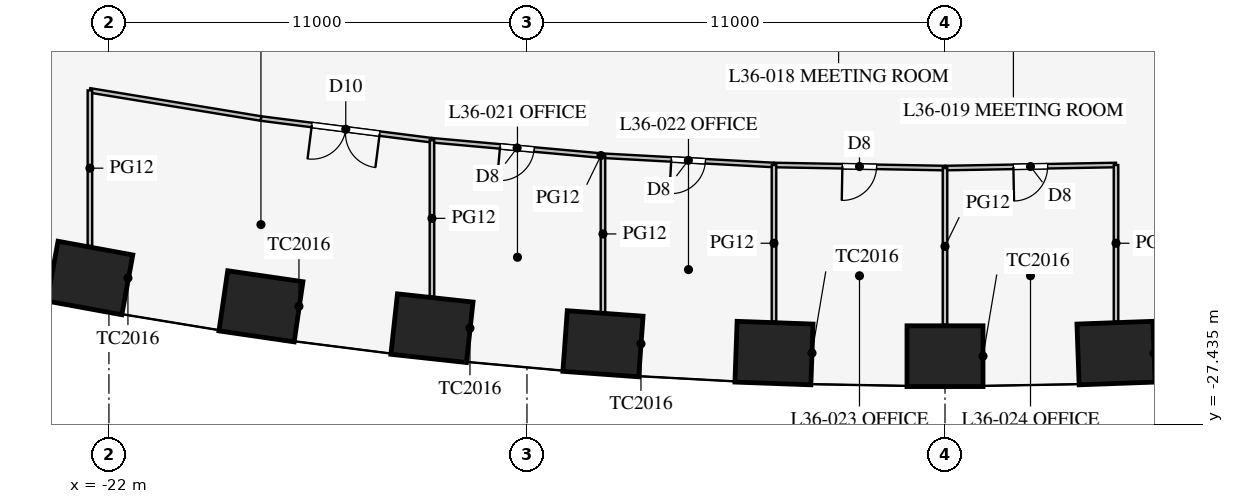
"""IFC4 building model, lengths in metres.
Left out: names, types, materials, properties, quantities, classifications, styles, units other than length and angle.
Written with IfcOpenShell. Run it as: python <this file> out.ifc"""

import sys

from ifc_helpers import new_model, si_unit, direction, frame, frame_2d, origin, origin_2d, place, context, subcontext, project, spatial, rectangle, extrude, element, fill, save


model = new_model("IFC4")
c1 = context("Model", 3, precision=1e-05, world=origin(), true_north=direction((0.0, 1.0)))
c2 = subcontext(c1, "Body", "Model", "MODEL_VIEW")
j1 = project(units=[si_unit("LENGTHUNIT", "METRE"), si_unit("PLANEANGLEUNIT", "RADIAN")], contexts=[c1])
p1 = place(None, origin())
s1 = spatial("IfcSite", under=j1, at=p1, CompositionType="ELEMENT")
p2 = place(p1, origin())
s2 = spatial("IfcBuilding", under=s1, at=p2, CompositionType="ELEMENT")
p3 = place(p2, frame((0.0, 0.0, 157.7)))
s3 = spatial("IfcBuildingStorey", under=s2, at=p3, CompositionType="ELEMENT", Elevation=157.7)
for number, where, z_axis, x_axis in (
    (1, (-22.5, -23.593, 0.0), (0.0, 0.0, 1.0), (0.984, -0.18, 0.0)),
    (2, (-18.0, -24.337, 0.0), (0.0, 0.0, 1.0), (0.99, -0.144, 0.0)),
    (3, (-13.5, -24.913, 0.0), (0.0, 0.0, 1.0), (0.994, -0.108, 0.0)),
    (4, (-9.0, -25.323, 0.0), (0.0, 0.0, 1.0), (0.997, -0.072, 0.0)),
    (5, (-4.5, -25.568, 0.0), (0.0, 0.0, 1.0), (0.999, -0.036, 0.0)),
    (6, (0.0, -25.65, 0.0), (0.0, 0.0, 1.0), (1.0, 0.0, 0.0)),
    (7, (4.5, -25.568, 0.0), (0.0, 0.0, 1.0), (0.999, 0.036, 0.0)),
):
    element("IfcColumn", number, at=place(p3, frame(where, z_axis=z_axis, x_axis=x_axis)), inside=s3, PredefinedType="COLUMN", context=c2, shape_type="SweptSolid", body=[
        extrude(rectangle(XDim=2.0, YDim=1.6, at=origin_2d()), origin(), (0.0, 0.0, 1.0), 4.2),
    ])
p4 = place(p3, frame((0.0, -20.7, 0.0), z_axis=(0.0, 0.0, 1.0), x_axis=(0.999837820638, 0.018009231578, 0.0)))
e8 = element("IfcWall", 8, at=p4, inside=s3, PredefinedType="PARTITIONING", context=c2, shape_type="SweptSolid", body=[
    extrude(rectangle(XDim=4.501, YDim=0.12, at=frame_2d((2.25, 0.0))), origin(), (0.0, 0.0, 1.0), 2.9),
])
p5 = place(p4, frame((1.8, 0.0, 0.15)))
e9 = element("IfcOpeningElement", 9, at=p5, cuts=e8, PredefinedType="OPENING", context=c2, shape_type="SweptSolid", body=[
    extrude(rectangle(XDim=0.9, YDim=2.1, at=frame_2d((0.45, 1.05))), frame((0.0, 0.07, 0.0), z_axis=(0.0, -1.0, 0.0), x_axis=(1.0, 0.0, 0.0)), (0.0, 0.0, 1.0), 0.14),
])
p6 = place(p3, frame((-13.5, -19.968, 0.0), z_axis=(0.0, 0.0, 1.0), x_axis=(0.995930325215, -0.090126507295, 0.0)))
e10 = element("IfcWall", 10, at=p6, inside=s3, PredefinedType="PARTITIONING", context=c2, shape_type="SweptSolid", body=[
    extrude(rectangle(XDim=4.518, YDim=0.12, at=frame_2d((2.259, 0.0))), origin(), (0.0, 0.0, 1.0), 2.9),
])
p7 = place(p6, frame((1.8, 0.0, 0.15)))
e11 = element("IfcOpeningElement", 11, at=p7, cuts=e10, PredefinedType="OPENING", context=c2, shape_type="SweptSolid", body=[
    extrude(rectangle(XDim=0.9, YDim=2.1, at=frame_2d((0.45, 1.05))), frame((0.0, 0.07, 0.0), z_axis=(0.0, -1.0, 0.0), x_axis=(1.0, 0.0, 0.0)), (0.0, 0.0, 1.0), 0.14),
])
p8 = place(p3, frame((-18.0, -19.396, 0.0), z_axis=(0.0, 0.0, 1.0), x_axis=(0.992010652594, -0.12615413247, 0.0)))
e12 = element("IfcWall", 12, at=p8, inside=s3, PredefinedType="PARTITIONING", context=c2, shape_type="SweptSolid", body=[
    extrude(rectangle(XDim=4.536, YDim=0.12, at=frame_2d((2.268, 0.0))), origin(), (0.0, 0.0, 1.0), 2.9),
])
p9 = place(p8, frame((1.35, 0.0, 0.15)))
e13 = element("IfcOpeningElement", 13, at=p9, cuts=e12, PredefinedType="OPENING", context=c2, shape_type="SweptSolid", body=[
    extrude(rectangle(XDim=1.8, YDim=2.1, at=frame_2d((0.9, 1.05))), frame((0.0, 0.07, 0.0), z_axis=(0.0, -1.0, 0.0), x_axis=(1.0, 0.0, 0.0)), (0.0, 0.0, 1.0), 0.14),
])
p10 = place(p3, frame((-22.5, -18.656, 0.0), z_axis=(0.0, 0.0, 1.0), x_axis=(0.986764681833, -0.162158757664, 0.0)))
e14 = element("IfcWall", 14, at=p10, inside=s3, PredefinedType="PARTITIONING", context=c2, shape_type="SweptSolid", body=[
    extrude(rectangle(XDim=4.56, YDim=0.12, at=frame_2d((2.28, 0.0))), origin(), (0.0, 0.0, 1.0), 2.9),
])
p11 = place(p3, frame((-4.5, -20.619, 0.0), z_axis=(0.0, 0.0, 1.0), x_axis=(0.999837820638, -0.018009231578, 0.0)))
e15 = element("IfcWall", 15, at=p11, inside=s3, PredefinedType="PARTITIONING", context=c2, shape_type="SweptSolid", body=[
    extrude(rectangle(XDim=4.501, YDim=0.12, at=frame_2d((2.25, 0.0))), origin(), (0.0, 0.0, 1.0), 2.9),
])
p12 = place(p11, frame((1.8, 0.0, 0.15)))
e16 = element("IfcOpeningElement", 16, at=p12, cuts=e15, PredefinedType="OPENING", context=c2, shape_type="SweptSolid", body=[
    extrude(rectangle(XDim=0.9, YDim=2.1, at=frame_2d((0.45, 1.05))), frame((0.0, 0.07, 0.0), z_axis=(0.0, -1.0, 0.0), x_axis=(1.0, 0.0, 0.0)), (0.0, 0.0, 1.0), 0.14),
])
p13 = place(p3, frame((-9.0, -20.375, 0.0), z_axis=(0.0, 0.0, 1.0), x_axis=(0.998537376538, -0.054065771581, 0.0)))
e17 = element("IfcWall", 17, at=p13, inside=s3, PredefinedType="PARTITIONING", context=c2, shape_type="SweptSolid", body=[
    extrude(rectangle(XDim=4.507, YDim=0.12, at=frame_2d((2.253, 0.0))), origin(), (0.0, 0.0, 1.0), 2.9),
])
p14 = place(p13, frame((1.8, 0.0, 0.15)))
e18 = element("IfcOpeningElement", 18, at=p14, cuts=e17, PredefinedType="OPENING", context=c2, shape_type="SweptSolid", body=[
    extrude(rectangle(XDim=0.9, YDim=2.1, at=frame_2d((0.45, 1.05))), frame((0.0, 0.07, 0.0), z_axis=(0.0, -1.0, 0.0), x_axis=(1.0, 0.0, 0.0)), (0.0, 0.0, 1.0), 0.14),
])
p15 = place(p3, frame((0.0, -20.7, 0.0), z_axis=(0.0, 0.0, 1.0), x_axis=(0.0, -1.0, 0.0)))
e19 = element("IfcWall", 19, at=p15, inside=s3, PredefinedType="PARTITIONING", context=c2, shape_type="SweptSolid", body=[
    extrude(rectangle(XDim=4.12, YDim=0.12, at=frame_2d((2.06, 0.0))), origin(), (0.0, 0.0, 1.0), 2.8),
])
p16 = place(p3, frame((4.5, -20.619, 0.0), z_axis=(0.0, 0.0, 1.0), x_axis=(0.0, -1.0, 0.0)))
e20 = element("IfcWall", 20, at=p16, inside=s3, PredefinedType="PARTITIONING", context=c2, shape_type="SweptSolid", body=[
    extrude(rectangle(XDim=4.119, YDim=0.12, at=frame_2d((2.06, 0.0))), origin(), (0.0, 0.0, 1.0), 2.8),
])
p17 = place(p3, frame((-13.5, -19.968, 0.0), z_axis=(0.0, 0.0, 1.0), x_axis=(0.0, -1.0, 0.0)))
e21 = element("IfcWall", 21, at=p17, inside=s3, PredefinedType="PARTITIONING", context=c2, shape_type="SweptSolid", body=[
    extrude(rectangle(XDim=4.11, YDim=0.12, at=frame_2d((2.055, 0.0))), origin(), (0.0, 0.0, 1.0), 2.6),
])
p18 = place(p3, frame((-22.5, -18.656, 0.0), z_axis=(0.0, 0.0, 1.0), x_axis=(0.0, -1.0, 0.0)))
e22 = element("IfcWall", 22, at=p18, inside=s3, PredefinedType="PARTITIONING", context=c2, shape_type="SweptSolid", body=[
    extrude(rectangle(XDim=4.093, YDim=0.12, at=frame_2d((2.046, 0.0))), origin(), (0.0, 0.0, 1.0), 2.9),
])
p19 = place(p3, frame((-4.5, -20.619, 0.0), z_axis=(0.0, 0.0, 1.0), x_axis=(0.0, -1.0, 0.0)))
e23 = element("IfcWall", 23, at=p19, inside=s3, PredefinedType="PARTITIONING", context=c2, shape_type="SweptSolid", body=[
    extrude(rectangle(XDim=4.119, YDim=0.12, at=frame_2d((2.06, 0.0))), origin(), (0.0, 0.0, 1.0), 2.8),
])
p20 = place(p3, frame((-9.0, -20.375, 0.0), z_axis=(0.0, 0.0, 1.0), x_axis=(0.0, -1.0, 0.0)))
e24 = element("IfcWall", 24, at=p20, inside=s3, PredefinedType="PARTITIONING", context=c2, shape_type="SweptSolid", body=[
    extrude(rectangle(XDim=4.116, YDim=0.12, at=frame_2d((2.058, 0.0))), origin(), (0.0, 0.0, 1.0), 2.9),
])
p21 = place(p9, frame((1.8, 0.0, 0.0), z_axis=(0.0, 0.0, 1.0), x_axis=(-1.0, 0.0, 0.0)))
e25 = element("IfcDoor", 25, at=p21, inside=s3, OperationType="DOUBLE_DOOR_SINGLE_SWING", PredefinedType="DOOR", context=c2, shape_type="SweptSolid", body=[
    extrude(rectangle(XDim=1.8, YDim=2.1, at=frame_2d((0.9, 1.05))), frame((0.0, 0.025, 0.0), z_axis=(0.0, -1.0, 0.0), x_axis=(1.0, 0.0, 0.0)), (0.0, 0.0, 1.0), 0.05),
])
fill(e13, e25)
p22 = place(p7, frame((0.9, 0.0, 0.0), z_axis=(0.0, 0.0, 1.0), x_axis=(-1.0, 0.0, 0.0)))
e26 = element("IfcDoor", 26, at=p22, inside=s3, OperationType="SINGLE_SWING_RIGHT", PredefinedType="DOOR", context=c2, shape_type="SweptSolid", body=[
    extrude(rectangle(XDim=0.9, YDim=2.1, at=frame_2d((0.45, 1.05))), frame((0.0, 0.025, 0.0), z_axis=(0.0, -1.0, 0.0), x_axis=(1.0, 0.0, 0.0)), (0.0, 0.0, 1.0), 0.05),
])
fill(e11, e26)
p23 = place(p14, frame((0.9, 0.0, 0.0), z_axis=(0.0, 0.0, 1.0), x_axis=(-1.0, 0.0, 0.0)))
e27 = element("IfcDoor", 27, at=p23, inside=s3, OperationType="SINGLE_SWING_RIGHT", PredefinedType="DOOR", context=c2, shape_type="SweptSolid", body=[
    extrude(rectangle(XDim=0.9, YDim=2.1, at=frame_2d((0.45, 1.05))), frame((0.0, 0.025, 0.0), z_axis=(0.0, -1.0, 0.0), x_axis=(1.0, 0.0, 0.0)), (0.0, 0.0, 1.0), 0.05),
])
fill(e18, e27)
p24 = place(p12, frame((0.9, 0.0, 0.0), z_axis=(0.0, 0.0, 1.0), x_axis=(-1.0, 0.0, 0.0)))
e28 = element("IfcDoor", 28, at=p24, inside=s3, OperationType="SINGLE_SWING_RIGHT", PredefinedType="DOOR", context=c2, shape_type="SweptSolid", body=[
    extrude(rectangle(XDim=0.9, YDim=2.1, at=frame_2d((0.45, 1.05))), frame((0.0, 0.025, 0.0), z_axis=(0.0, -1.0, 0.0), x_axis=(1.0, 0.0, 0.0)), (0.0, 0.0, 1.0), 0.05),
])
fill(e16, e28)
p25 = place(p5, frame((0.9, 0.0, 0.0), z_axis=(0.0, 0.0, 1.0), x_axis=(-1.0, 0.0, 0.0)))
e29 = element("IfcDoor", 29, at=p25, inside=s3, OperationType="SINGLE_SWING_RIGHT", PredefinedType="DOOR", context=c2, shape_type="SweptSolid", body=[
    extrude(rectangle(XDim=0.9, YDim=2.1, at=frame_2d((0.45, 1.05))), frame((0.0, 0.025, 0.0), z_axis=(0.0, -1.0, 0.0), x_axis=(1.0, 0.0, 0.0)), (0.0, 0.0, 1.0), 0.05),
])
fill(e9, e29)
save(model, sys.argv[1])
